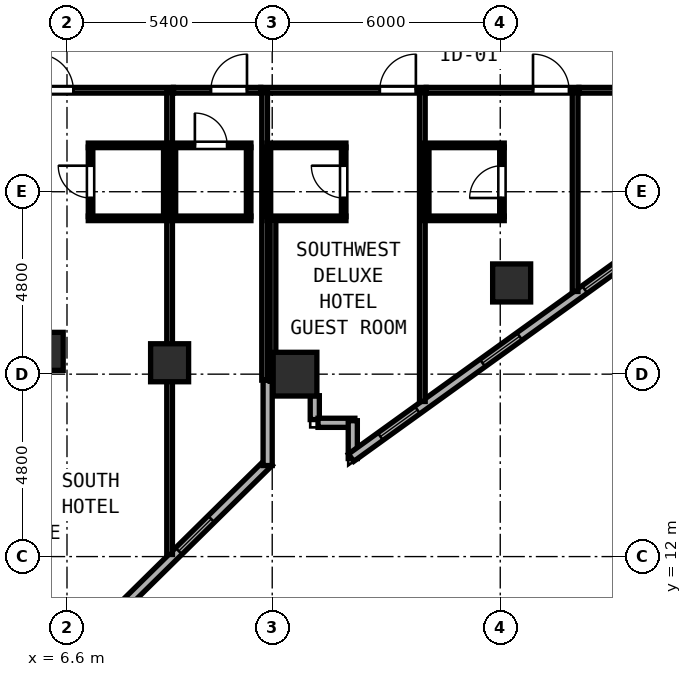
"""IFC4 building model, lengths in metres.
Left out: names, types, materials, properties, quantities, classifications, styles, units other than length and angle.
Written with IfcOpenShell. Run it as: python <this file> out.ifc"""

import sys

from ifc_helpers import new_model, si_unit, direction, frame, frame_2d, origin, origin_2d, place, context, subcontext, project, spatial, rectangle, hollow_rectangle, extrude, element, fill, save


model = new_model("IFC4")
c1 = context("Model", 3, precision=1e-05, world=origin(), true_north=direction((0.0, 1.0)))
c2 = subcontext(c1, "Body", "Model", "MODEL_VIEW")
j1 = project(units=[si_unit("LENGTHUNIT", "METRE"), si_unit("PLANEANGLEUNIT", "RADIAN")], contexts=[c1])
p1 = place(None, origin())
s1 = spatial("IfcSite", under=j1, at=p1, CompositionType="ELEMENT")
p2 = place(p1, origin())
s2 = spatial("IfcBuilding", under=s1, at=p2, CompositionType="ELEMENT")
p3 = place(p2, frame((0.0, 0.0, 47.6)))
s3 = spatial("IfcBuildingStorey", under=s2, at=p3, CompositionType="ELEMENT", Elevation=47.6)
p4 = place(p3, frame((12.6, 16.8, 0.0), z_axis=(0.0, 0.0, 1.0), x_axis=(1.0, 0.0, 0.0)))
e1 = element("IfcColumn", 1, at=p4, inside=s3, PredefinedType="COLUMN", context=c2, shape_type="SweptSolid", body=[
    extrude(hollow_rectangle(XDim=1.15, YDim=1.15, WallThickness=0.042, at=origin_2d()), origin(), (0.0, 0.0, 1.0), 3.8),
])
for number, where, z_axis, x_axis in (
    (2, (6.0, 17.4, 0.0), (0.0, 0.0, 1.0), (1.0, 0.0, 0.0)),
    (3, (18.3, 19.2, 0.0), (0.0, 0.0, 1.0), (1.0, 0.0, 0.0)),
    (4, (9.3, 17.1, 0.0), (0.0, 0.0, 1.0), (1.0, 0.0, 0.0)),
):
    element("IfcColumn", number, at=place(p3, frame(where, z_axis=z_axis, x_axis=x_axis)), inside=s3, PredefinedType="COLUMN", context=c2, shape_type="SweptSolid", body=[
        extrude(hollow_rectangle(XDim=1.0, YDim=1.0, WallThickness=0.038, at=origin_2d()), origin(), (0.0, 0.0, 1.0), 3.8),
    ])
p5 = place(p3, frame((4.156, 6.837, 0.0), z_axis=(0.0, 0.0, 1.0), x_axis=(0.712195287167, 0.701981390735, 0.0)))
e5 = element("IfcWall", 5, at=p5, inside=s3, PredefinedType="SOLIDWALL", context=c2, shape_type="SweptSolid", body=[
    extrude(rectangle(XDim=10.9, YDim=0.24, at=frame_2d((5.45, 0.0))), origin(), (0.0, 0.0, 1.0), 3.6),
])
p6 = place(p5, frame((1.6, 0.0, 0.85)))
e6 = element("IfcOpeningElement", 6, at=p6, cuts=e5, PredefinedType="OPENING", context=c2, shape_type="SweptSolid", body=[
    extrude(rectangle(XDim=1.2, YDim=1.85, at=frame_2d((0.6, 0.925))), frame((0.0, 0.13, 0.0), z_axis=(0.0, -1.0, 0.0), x_axis=(1.0, 0.0, 0.0)), (0.0, 0.0, 1.0), 0.26),
])
p7 = place(p5, frame((7.561, 0.0, 0.85)))
e7 = element("IfcOpeningElement", 7, at=p7, cuts=e5, PredefinedType="OPENING", context=c2, shape_type="SweptSolid", body=[
    extrude(rectangle(XDim=1.2, YDim=1.85, at=frame_2d((0.6, 0.925))), frame((0.0, 0.13, 0.0), z_axis=(0.0, -1.0, 0.0), x_axis=(1.0, 0.0, 0.0)), (0.0, 0.0, 1.0), 0.26),
])
p8 = place(p3, frame((11.88, 14.395, 0.0), z_axis=(0.0, 0.0, 1.0), x_axis=(0.0, 1.0, 0.0)))
e8 = element("IfcWall", 8, at=p8, inside=s3, PredefinedType="SOLIDWALL", context=c2, shape_type="SweptSolid", body=[
    extrude(rectangle(XDim=2.245, YDim=0.24, at=frame_2d((1.122, 0.0))), origin(), (0.0, 0.0, 1.0), 3.6),
])
p9 = place(p3, frame((13.12, 16.233, 0.0), z_axis=(0.0, 0.0, 1.0), x_axis=(0.0, -1.0, 0.0)))
e9 = element("IfcWall", 9, at=p9, inside=s3, PredefinedType="SOLIDWALL", context=c2, shape_type="SweptSolid", body=[
    extrude(rectangle(XDim=0.628, YDim=0.24, at=frame_2d((0.314, 0.0))), origin(), (0.0, 0.0, 1.0), 3.6),
])
p10 = place(p3, frame((13.205, 15.52, 0.0), z_axis=(0.0, 0.0, 1.0), x_axis=(1.0, 0.0, 0.0)))
e10 = element("IfcWall", 10, at=p10, inside=s3, PredefinedType="SOLIDWALL", context=c2, shape_type="SweptSolid", body=[
    extrude(rectangle(XDim=0.97, YDim=0.24, at=frame_2d((0.485, 0.0))), origin(), (0.0, 0.0, 1.0), 3.6),
])
p11 = place(p3, frame((14.12, 15.575, 0.0), z_axis=(0.0, 0.0, 1.0), x_axis=(0.0, -1.0, 0.0)))
e11 = element("IfcWall", 11, at=p11, inside=s3, PredefinedType="SOLIDWALL", context=c2, shape_type="SweptSolid", body=[
    extrude(rectangle(XDim=0.996, YDim=0.24, at=frame_2d((0.498, 0.0))), origin(), (0.0, 0.0, 1.0), 3.6),
])
p12 = place(p3, frame((14.075, 14.602, 0.0), z_axis=(0.0, 0.0, 1.0), x_axis=(0.811543176492, 0.58429245476, 0.0)))
e12 = element("IfcWall", 12, at=p12, inside=s3, PredefinedType="SOLIDWALL", context=c2, shape_type="SweptSolid", body=[
    extrude(rectangle(XDim=11.531, YDim=0.24, at=frame_2d((5.765, 0.0))), origin(), (0.0, 0.0, 1.0), 3.097),
])
p13 = place(p12, frame((0.95, 0.0, 0.85)))
e13 = element("IfcOpeningElement", 13, at=p13, cuts=e12, PredefinedType="OPENING", context=c2, shape_type="SweptSolid", body=[
    extrude(rectangle(XDim=1.2, YDim=1.85, at=frame_2d((0.6, 0.925))), frame((0.0, 0.13, 0.0), z_axis=(0.0, -1.0, 0.0), x_axis=(1.0, 0.0, 0.0)), (0.0, 0.0, 1.0), 0.26),
])
p14 = place(p12, frame((7.574, 0.0, 0.85)))
e14 = element("IfcOpeningElement", 14, at=p14, cuts=e12, PredefinedType="OPENING", context=c2, shape_type="SweptSolid", body=[
    extrude(rectangle(XDim=1.2, YDim=1.85, at=frame_2d((0.6, 0.925))), frame((0.0, 0.13, 0.0), z_axis=(0.0, -1.0, 0.0), x_axis=(1.0, 0.0, 0.0)), (0.0, 0.0, 1.0), 0.26),
])
p15 = place(p12, frame((4.262, 0.0, 0.85)))
e15 = element("IfcOpeningElement", 15, at=p15, cuts=e12, PredefinedType="OPENING", context=c2, shape_type="SweptSolid", body=[
    extrude(rectangle(XDim=1.2, YDim=1.85, at=frame_2d((0.6, 0.925))), frame((0.0, 0.13, 0.0), z_axis=(0.0, -1.0, 0.0), x_axis=(1.0, 0.0, 0.0)), (0.0, 0.0, 1.0), 0.26),
])
p16 = place(p3, frame((11.7, 24.27, 0.0), z_axis=(0.0, 0.0, 1.0), x_axis=(1.0, 0.0, 0.0)))
e16 = element("IfcWall", 16, at=p16, inside=s3, PredefinedType="PARTITIONING", context=c2, shape_type="SweptSolid", body=[
    extrude(rectangle(XDim=4.35, YDim=0.15, at=frame_2d((2.175, 0.0))), origin(), (0.0, 0.0, 1.0), 3.6),
])
p17 = place(p16, frame((4.08, 0.0, 0.0), z_axis=(0.0, 0.0, 1.0), x_axis=(-1.0, 0.0, 0.0)))
e17 = element("IfcOpeningElement", 17, at=p17, cuts=e16, PredefinedType="OPENING", context=c2, shape_type="SweptSolid", body=[
    extrude(rectangle(XDim=0.95, YDim=2.15, at=frame_2d((0.475, 1.075))), frame((0.0, 0.085, 0.0), z_axis=(0.0, -1.0, 0.0), x_axis=(1.0, 0.0, 0.0)), (0.0, 0.0, 1.0), 0.17),
])
p18 = place(p3, frame((11.8, 16.642, 0.0), z_axis=(0.0, 0.0, 1.0), x_axis=(0.0, 1.0, 0.0)))
e18 = element("IfcWall", 18, at=p18, inside=s3, PredefinedType="PARTITIONING", context=c2, shape_type="SweptSolid", body=[
    extrude(rectangle(XDim=7.568, YDim=0.15, at=frame_2d((3.784, 0.0))), origin(), (0.0, 0.0, 1.0), 3.6),
])
p19 = place(p3, frame((15.95, 16.081, 0.0), z_axis=(0.0, 0.0, 1.0), x_axis=(0.0, 1.0, 0.0)))
e19 = element("IfcWall", 19, at=p19, inside=s3, PredefinedType="PARTITIONING", context=c2, shape_type="SweptSolid", body=[
    extrude(rectangle(XDim=8.129, YDim=0.15, at=frame_2d((4.064, 0.0))), origin(), (0.0, 0.0, 1.0), 3.6),
])
for number, where, z_axis, x_axis in (
    (20, (11.86, 22.82, 0.0), (0.0, 0.0, 1.0), (1.0, 0.0, 0.0)),
    (21, (11.86, 20.9, 0.0), (0.0, 0.0, 1.0), (1.0, 0.0, 0.0)),
):
    element("IfcWall", number, at=place(p3, frame(where, z_axis=z_axis, x_axis=x_axis)), inside=s3, PredefinedType="PARTITIONING", context=c2, shape_type="SweptSolid", body=[
        extrude(rectangle(XDim=2.08, YDim=0.12, at=frame_2d((1.04, 0.0))), origin(), (0.0, 0.0, 1.0), 3.6),
    ])
p20 = place(p3, frame((11.9, 20.945, 0.0), z_axis=(0.0, 0.0, 1.0), x_axis=(0.0, 1.0, 0.0)))
e22 = element("IfcWall", 22, at=p20, inside=s3, PredefinedType="PARTITIONING", context=c2, shape_type="SweptSolid", body=[
    extrude(rectangle(XDim=1.83, YDim=0.12, at=frame_2d((0.915, 0.0))), origin(), (0.0, 0.0, 1.0), 3.6),
])
p21 = place(p3, frame((13.88, 20.945, 0.0), z_axis=(0.0, 0.0, 1.0), x_axis=(0.0, 1.0, 0.0)))
e23 = element("IfcWall", 23, at=p21, inside=s3, PredefinedType="PARTITIONING", context=c2, shape_type="SweptSolid", body=[
    extrude(rectangle(XDim=1.83, YDim=0.12, at=frame_2d((0.915, 0.0))), origin(), (0.0, 0.0, 1.0), 3.6),
])
p22 = place(p21, frame((0.49, 0.0, 0.0)))
e24 = element("IfcOpeningElement", 24, at=p22, cuts=e23, PredefinedType="OPENING", context=c2, shape_type="SweptSolid", body=[
    extrude(rectangle(XDim=0.85, YDim=2.1, at=frame_2d((0.425, 1.05))), frame((0.0, 0.07, 0.0), z_axis=(0.0, -1.0, 0.0), x_axis=(1.0, 0.0, 0.0)), (0.0, 0.0, 1.0), 0.14),
])
p23 = place(p3, frame((16.052, 24.27, 0.0), z_axis=(0.0, 0.0, 1.0), x_axis=(1.0, 0.0, 0.0)))
e25 = element("IfcWall", 25, at=p23, inside=s3, PredefinedType="PARTITIONING", context=c2, shape_type="SweptSolid", body=[
    extrude(rectangle(XDim=4.018, YDim=0.15, at=frame_2d((2.009, 0.0))), origin(), (0.0, 0.0, 1.0), 3.6),
])
p24 = place(p23, frame((3.76, 0.0, 0.0), z_axis=(0.0, 0.0, 1.0), x_axis=(-1.0, 0.0, 0.0)))
e26 = element("IfcOpeningElement", 26, at=p24, cuts=e25, PredefinedType="OPENING", context=c2, shape_type="SweptSolid", body=[
    extrude(rectangle(XDim=0.95, YDim=2.15, at=frame_2d((0.475, 1.075))), frame((0.0, 0.085, 0.0), z_axis=(0.0, -1.0, 0.0), x_axis=(1.0, 0.0, 0.0)), (0.0, 0.0, 1.0), 0.17),
])
p25 = place(p3, frame((19.97, 18.976, 0.0), z_axis=(0.0, 0.0, 1.0), x_axis=(0.0, 1.0, 0.0)))
e27 = element("IfcWall", 27, at=p25, inside=s3, PredefinedType="PARTITIONING", context=c2, shape_type="SweptSolid", body=[
    extrude(rectangle(XDim=5.234, YDim=0.15, at=frame_2d((2.617, 0.0))), origin(), (0.0, 0.0, 1.0), 3.6),
])
for number, where, z_axis, x_axis in (
    (28, (16.01, 22.82, 0.0), (0.0, 0.0, 1.0), (1.0, 0.0, 0.0)),
    (29, (16.01, 20.9, 0.0), (0.0, 0.0, 1.0), (1.0, 0.0, 0.0)),
):
    element("IfcWall", number, at=place(p3, frame(where, z_axis=z_axis, x_axis=x_axis)), inside=s3, PredefinedType="PARTITIONING", context=c2, shape_type="SweptSolid", body=[
        extrude(rectangle(XDim=2.095, YDim=0.12, at=frame_2d((1.047, 0.0))), origin(), (0.0, 0.0, 1.0), 3.6),
    ])
p26 = place(p3, frame((16.065, 20.945, 0.0), z_axis=(0.0, 0.0, 1.0), x_axis=(0.0, 1.0, 0.0)))
e30 = element("IfcWall", 30, at=p26, inside=s3, PredefinedType="PARTITIONING", context=c2, shape_type="SweptSolid", body=[
    extrude(rectangle(XDim=1.83, YDim=0.12, at=frame_2d((0.915, 0.0))), origin(), (0.0, 0.0, 1.0), 3.6),
])
p27 = place(p3, frame((18.045, 20.945, 0.0), z_axis=(0.0, 0.0, 1.0), x_axis=(0.0, 1.0, 0.0)))
e31 = element("IfcWall", 31, at=p27, inside=s3, PredefinedType="PARTITIONING", context=c2, shape_type="SweptSolid", body=[
    extrude(rectangle(XDim=1.83, YDim=0.12, at=frame_2d((0.915, 0.0))), origin(), (0.0, 0.0, 1.0), 3.6),
])
p28 = place(p27, frame((0.49, 0.0, 0.0)))
e32 = element("IfcOpeningElement", 32, at=p28, cuts=e31, PredefinedType="OPENING", context=c2, shape_type="SweptSolid", body=[
    extrude(rectangle(XDim=0.85, YDim=2.1, at=frame_2d((0.425, 1.05))), frame((0.0, 0.07, 0.0), z_axis=(0.0, -1.0, 0.0), x_axis=(1.0, 0.0, 0.0)), (0.0, 0.0, 1.0), 0.14),
])
p29 = place(p3, frame((20.072, 24.27, 0.0), z_axis=(0.0, 0.0, 1.0), x_axis=(1.0, 0.0, 0.0)))
e33 = element("IfcWall", 33, at=p29, inside=s3, PredefinedType="PARTITIONING", context=c2, shape_type="SweptSolid", body=[
    extrude(rectangle(XDim=3.846, YDim=0.15, at=frame_2d((1.923, 0.0))), origin(), (0.0, 0.0, 1.0), 3.6),
])
p30 = place(p29, frame((2.308, 0.0, 0.0), z_axis=(0.0, 0.0, 1.0), x_axis=(-1.0, 0.0, 0.0)))
e34 = element("IfcOpeningElement", 34, at=p30, cuts=e33, PredefinedType="OPENING", context=c2, shape_type="SweptSolid", body=[
    extrude(rectangle(XDim=0.95, YDim=2.12, at=frame_2d((0.475, 1.06))), frame((0.0, 0.085, 0.0), z_axis=(0.0, -1.0, 0.0), x_axis=(1.0, 0.0, 0.0)), (0.0, 0.0, 1.0), 0.17),
])
p31 = place(p3, frame((2.305, 24.27, 0.0), z_axis=(0.0, 0.0, 1.0), x_axis=(1.0, 0.0, 0.0)))
e35 = element("IfcWall", 35, at=p31, inside=s3, PredefinedType="PARTITIONING", context=c2, shape_type="SweptSolid", body=[
    extrude(rectangle(XDim=7.095, YDim=0.15, at=frame_2d((3.547, 0.0))), origin(), (0.0, 0.0, 1.0), 3.6),
])
p32 = place(p31, frame((4.462, 0.0, 0.0), z_axis=(0.0, 0.0, 1.0), x_axis=(-1.0, 0.0, 0.0)))
e36 = element("IfcOpeningElement", 36, at=p32, cuts=e35, PredefinedType="OPENING", context=c2, shape_type="SweptSolid", body=[
    extrude(rectangle(XDim=0.95, YDim=2.18, at=frame_2d((0.475, 1.09))), frame((0.0, 0.085, 0.0), z_axis=(0.0, -1.0, 0.0), x_axis=(1.0, 0.0, 0.0)), (0.0, 0.0, 1.0), 0.17),
])
p33 = place(p3, frame((9.3, 12.054, 0.0), z_axis=(0.0, 0.0, 1.0), x_axis=(0.0, 1.0, 0.0)))
e37 = element("IfcWall", 37, at=p33, inside=s3, PredefinedType="PARTITIONING", context=c2, shape_type="SweptSolid", body=[
    extrude(rectangle(XDim=12.156, YDim=0.15, at=frame_2d((6.078, 0.0))), origin(), (0.0, 0.0, 1.0), 3.6),
])
for number, where, z_axis, x_axis in (
    (38, (7.16, 22.82, 0.0), (0.0, 0.0, 1.0), (1.0, 0.0, 0.0)),
    (39, (7.16, 20.9, 0.0), (0.0, 0.0, 1.0), (1.0, 0.0, 0.0)),
):
    element("IfcWall", number, at=place(p3, frame(where, z_axis=z_axis, x_axis=x_axis)), inside=s3, PredefinedType="PARTITIONING", context=c2, shape_type="SweptSolid", body=[
        extrude(rectangle(XDim=2.08, YDim=0.12, at=frame_2d((1.04, 0.0))), origin(), (0.0, 0.0, 1.0), 3.6),
    ])
p34 = place(p3, frame((7.22, 20.945, 0.0), z_axis=(0.0, 0.0, 1.0), x_axis=(0.0, 1.0, 0.0)))
e40 = element("IfcWall", 40, at=p34, inside=s3, PredefinedType="PARTITIONING", context=c2, shape_type="SweptSolid", body=[
    extrude(rectangle(XDim=1.83, YDim=0.12, at=frame_2d((0.915, 0.0))), origin(), (0.0, 0.0, 1.0), 3.6),
])
p35 = place(p34, frame((1.34, 0.0, 0.0), z_axis=(0.0, 0.0, 1.0), x_axis=(-1.0, 0.0, 0.0)))
e41 = element("IfcOpeningElement", 41, at=p35, cuts=e40, PredefinedType="OPENING", context=c2, shape_type="SweptSolid", body=[
    extrude(rectangle(XDim=0.85, YDim=2.1, at=frame_2d((0.425, 1.05))), frame((0.0, 0.07, 0.0), z_axis=(0.0, -1.0, 0.0), x_axis=(1.0, 0.0, 0.0)), (0.0, 0.0, 1.0), 0.14),
])
p36 = place(p3, frame((9.2, 20.945, 0.0), z_axis=(0.0, 0.0, 1.0), x_axis=(0.0, 1.0, 0.0)))
e42 = element("IfcWall", 42, at=p36, inside=s3, PredefinedType="PARTITIONING", context=c2, shape_type="SweptSolid", body=[
    extrude(rectangle(XDim=1.83, YDim=0.12, at=frame_2d((0.915, 0.0))), origin(), (0.0, 0.0, 1.0), 3.6),
])
p37 = place(p3, frame((9.402, 24.27, 0.0), z_axis=(0.0, 0.0, 1.0), x_axis=(1.0, 0.0, 0.0)))
e43 = element("IfcWall", 43, at=p37, inside=s3, PredefinedType="PARTITIONING", context=c2, shape_type="SweptSolid", body=[
    extrude(rectangle(XDim=2.296, YDim=0.15, at=frame_2d((1.148, 0.0))), origin(), (0.0, 0.0, 1.0), 3.6),
])
p38 = place(p37, frame((1.934, 0.0, 0.0), z_axis=(0.0, 0.0, 1.0), x_axis=(-1.0, 0.0, 0.0)))
e44 = element("IfcOpeningElement", 44, at=p38, cuts=e43, PredefinedType="OPENING", context=c2, shape_type="SweptSolid", body=[
    extrude(rectangle(XDim=0.95, YDim=2.15, at=frame_2d((0.475, 1.075))), frame((0.0, 0.085, 0.0), z_axis=(0.0, -1.0, 0.0), x_axis=(1.0, 0.0, 0.0)), (0.0, 0.0, 1.0), 0.17),
])
p39 = place(p3, frame((12.02, 16.612, 0.0), z_axis=(0.0, 0.0, 1.0), x_axis=(0.0, 1.0, 0.0)))
e45 = element("IfcWall", 45, at=p39, inside=s3, PredefinedType="PARTITIONING", context=c2, shape_type="SweptSolid", body=[
    extrude(rectangle(XDim=4.243, YDim=0.15, at=frame_2d((2.122, 0.0))), origin(), (0.0, 0.0, 1.0), 3.6),
])
p40 = place(p3, frame((9.36, 22.82, 0.0), z_axis=(0.0, 0.0, 1.0), x_axis=(1.0, 0.0, 0.0)))
e46 = element("IfcWall", 46, at=p40, inside=s3, PredefinedType="PARTITIONING", context=c2, shape_type="SweptSolid", body=[
    extrude(rectangle(XDim=2.08, YDim=0.12, at=frame_2d((1.04, 0.0))), origin(), (0.0, 0.0, 1.0), 3.6),
])
p41 = place(p40, frame((1.455, 0.0, 0.0), z_axis=(0.0, 0.0, 1.0), x_axis=(-1.0, 0.0, 0.0)))
e47 = element("IfcOpeningElement", 47, at=p41, cuts=e46, PredefinedType="OPENING", context=c2, shape_type="SweptSolid", body=[
    extrude(rectangle(XDim=0.85, YDim=2.1, at=frame_2d((0.425, 1.05))), frame((0.0, 0.07, 0.0), z_axis=(0.0, -1.0, 0.0), x_axis=(1.0, 0.0, 0.0)), (0.0, 0.0, 1.0), 0.14),
])
p42 = place(p3, frame((9.36, 20.9, 0.0), z_axis=(0.0, 0.0, 1.0), x_axis=(1.0, 0.0, 0.0)))
e48 = element("IfcWall", 48, at=p42, inside=s3, PredefinedType="PARTITIONING", context=c2, shape_type="SweptSolid", body=[
    extrude(rectangle(XDim=2.08, YDim=0.12, at=frame_2d((1.04, 0.0))), origin(), (0.0, 0.0, 1.0), 3.6),
])
for number, where, z_axis, x_axis in (
    (49, (9.4, 20.945, 0.0), (0.0, 0.0, 1.0), (0.0, 1.0, 0.0)),
    (50, (11.38, 20.945, 0.0), (0.0, 0.0, 1.0), (0.0, 1.0, 0.0)),
):
    element("IfcWall", number, at=place(p3, frame(where, z_axis=z_axis, x_axis=x_axis)), inside=s3, PredefinedType="PARTITIONING", context=c2, shape_type="SweptSolid", body=[
        extrude(rectangle(XDim=1.83, YDim=0.12, at=frame_2d((0.915, 0.0))), origin(), (0.0, 0.0, 1.0), 3.6),
    ])
p43 = place(p7, origin())
e51 = element("IfcWindow", 51, at=p43, inside=s3, PartitioningType="SINGLE_PANEL", PredefinedType="WINDOW", context=c2, shape_type="SweptSolid", body=[
    extrude(rectangle(XDim=1.2, YDim=1.85, at=frame_2d((0.6, 0.925))), frame((0.0, 0.03, 0.0), z_axis=(0.0, -1.0, 0.0), x_axis=(1.0, 0.0, 0.0)), (0.0, 0.0, 1.0), 0.06),
])
fill(e7, e51)
p44 = place(p13, origin())
e52 = element("IfcWindow", 52, at=p44, inside=s3, PartitioningType="SINGLE_PANEL", PredefinedType="WINDOW", context=c2, shape_type="SweptSolid", body=[
    extrude(rectangle(XDim=1.2, YDim=1.85, at=frame_2d((0.6, 0.925))), frame((0.0, 0.03, 0.0), z_axis=(0.0, -1.0, 0.0), x_axis=(1.0, 0.0, 0.0)), (0.0, 0.0, 1.0), 0.06),
])
fill(e13, e52)
p45 = place(p14, origin())
e53 = element("IfcWindow", 53, at=p45, inside=s3, PartitioningType="SINGLE_PANEL", PredefinedType="WINDOW", context=c2, shape_type="SweptSolid", body=[
    extrude(rectangle(XDim=1.2, YDim=1.85, at=frame_2d((0.6, 0.925))), frame((0.0, 0.03, 0.0), z_axis=(0.0, -1.0, 0.0), x_axis=(1.0, 0.0, 0.0)), (0.0, 0.0, 1.0), 0.06),
])
fill(e14, e53)
p46 = place(p17, origin())
e54 = element("IfcDoor", 54, at=p46, inside=s3, OperationType="SINGLE_SWING_LEFT", PredefinedType="DOOR", context=c2, shape_type="SweptSolid", body=[
    extrude(rectangle(XDim=0.95, YDim=2.15, at=frame_2d((0.475, 1.075))), frame((0.0, 0.025, 0.0), z_axis=(0.0, -1.0, 0.0), x_axis=(1.0, 0.0, 0.0)), (0.0, 0.0, 1.0), 0.05),
])
fill(e17, e54)
p47 = place(p22, origin())
e55 = element("IfcDoor", 55, at=p47, inside=s3, OperationType="SINGLE_SWING_RIGHT", PredefinedType="DOOR", context=c2, shape_type="SweptSolid", body=[
    extrude(rectangle(XDim=0.85, YDim=2.1, at=frame_2d((0.425, 1.05))), frame((0.0, 0.025, 0.0), z_axis=(0.0, -1.0, 0.0), x_axis=(1.0, 0.0, 0.0)), (0.0, 0.0, 1.0), 0.05),
])
fill(e24, e55)
p48 = place(p24, origin())
e56 = element("IfcDoor", 56, at=p48, inside=s3, OperationType="SINGLE_SWING_RIGHT", PredefinedType="DOOR", context=c2, shape_type="SweptSolid", body=[
    extrude(rectangle(XDim=0.95, YDim=2.15, at=frame_2d((0.475, 1.075))), frame((0.0, 0.025, 0.0), z_axis=(0.0, -1.0, 0.0), x_axis=(1.0, 0.0, 0.0)), (0.0, 0.0, 1.0), 0.05),
])
fill(e26, e56)
p49 = place(p28, origin())
e57 = element("IfcDoor", 57, at=p49, inside=s3, OperationType="SINGLE_SWING_LEFT", PredefinedType="DOOR", context=c2, shape_type="SweptSolid", body=[
    extrude(rectangle(XDim=0.85, YDim=2.1, at=frame_2d((0.425, 1.05))), frame((0.0, 0.025, 0.0), z_axis=(0.0, -1.0, 0.0), x_axis=(1.0, 0.0, 0.0)), (0.0, 0.0, 1.0), 0.05),
])
fill(e32, e57)
p50 = place(p32, origin())
e58 = element("IfcDoor", 58, at=p50, inside=s3, OperationType="SINGLE_SWING_RIGHT", PredefinedType="DOOR", context=c2, shape_type="SweptSolid", body=[
    extrude(rectangle(XDim=0.95, YDim=2.18, at=frame_2d((0.475, 1.09))), frame((0.0, 0.025, 0.0), z_axis=(0.0, -1.0, 0.0), x_axis=(1.0, 0.0, 0.0)), (0.0, 0.0, 1.0), 0.05),
])
fill(e36, e58)
p51 = place(p35, origin())
e59 = element("IfcDoor", 59, at=p51, inside=s3, OperationType="SINGLE_SWING_LEFT", PredefinedType="DOOR", context=c2, shape_type="SweptSolid", body=[
    extrude(rectangle(XDim=0.85, YDim=2.1, at=frame_2d((0.425, 1.05))), frame((0.0, 0.025, 0.0), z_axis=(0.0, -1.0, 0.0), x_axis=(1.0, 0.0, 0.0)), (0.0, 0.0, 1.0), 0.05),
])
fill(e41, e59)
p52 = place(p38, origin())
e60 = element("IfcDoor", 60, at=p52, inside=s3, OperationType="SINGLE_SWING_LEFT", PredefinedType="DOOR", context=c2, shape_type="SweptSolid", body=[
    extrude(rectangle(XDim=0.95, YDim=2.15, at=frame_2d((0.475, 1.075))), frame((0.0, 0.025, 0.0), z_axis=(0.0, -1.0, 0.0), x_axis=(1.0, 0.0, 0.0)), (0.0, 0.0, 1.0), 0.05),
])
fill(e44, e60)
p53 = place(p41, origin())
e61 = element("IfcDoor", 61, at=p53, inside=s3, OperationType="SINGLE_SWING_RIGHT", PredefinedType="DOOR", context=c2, shape_type="SweptSolid", body=[
    extrude(rectangle(XDim=0.85, YDim=2.1, at=frame_2d((0.425, 1.05))), frame((0.0, 0.025, 0.0), z_axis=(0.0, -1.0, 0.0), x_axis=(1.0, 0.0, 0.0)), (0.0, 0.0, 1.0), 0.05),
])
fill(e47, e61)
p54 = place(p15, origin())
e62 = element("IfcWindow", 62, at=p54, inside=s3, PartitioningType="SINGLE_PANEL", PredefinedType="WINDOW", context=c2, shape_type="SweptSolid", body=[
    extrude(rectangle(XDim=1.2, YDim=1.85, at=frame_2d((0.6, 0.925))), frame((0.0, 0.03, 0.0), z_axis=(0.0, -1.0, 0.0), x_axis=(1.0, 0.0, 0.0)), (0.0, 0.0, 1.0), 0.06),
])
fill(e15, e62)
save(model, sys.argv[1])
